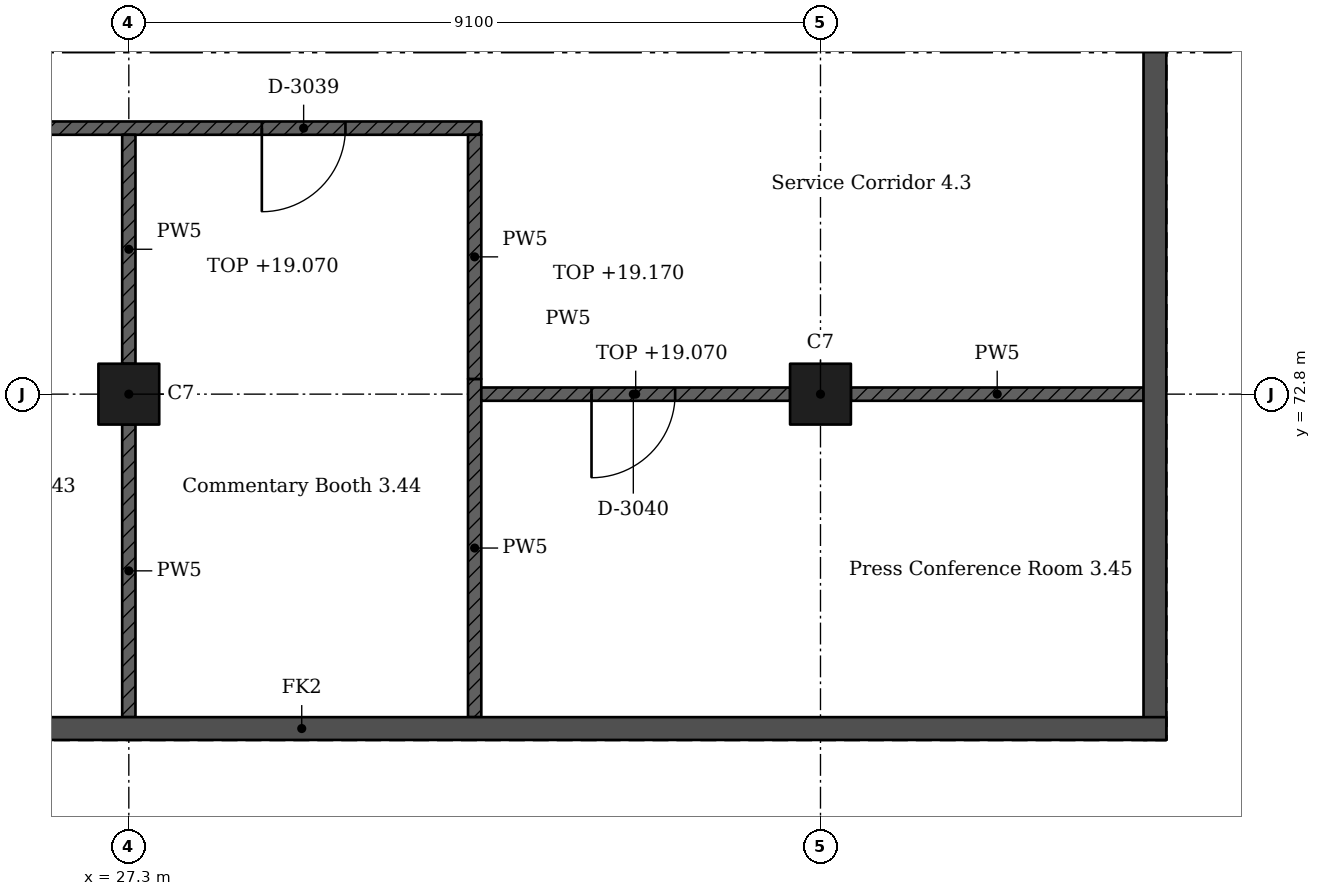
"""IFC4 building model, lengths in metres.
Left out: names, types, materials, properties, quantities, classifications, styles, units other than length and angle.
Written with IfcOpenShell. Run it as: python <this file> out.ifc"""

import sys

from ifc_helpers import new_model, si_unit, direction, frame, frame_2d, origin, origin_2d, place, context, subcontext, project, spatial, rectangle, extrude, element, fill, save


model = new_model("IFC4")
c1 = context("Model", 3, precision=1e-05, world=origin(), true_north=direction((0.0, 1.0)))
c2 = subcontext(c1, "Body", "Model", "MODEL_VIEW")
j1 = project(units=[si_unit("LENGTHUNIT", "METRE"), si_unit("PLANEANGLEUNIT", "RADIAN")], contexts=[c1])
p1 = place(None, origin())
s1 = spatial("IfcSite", under=j1, at=p1, CompositionType="ELEMENT")
p2 = place(p1, origin())
s2 = spatial("IfcBuilding", under=s1, at=p2, CompositionType="ELEMENT")
p3 = place(p2, frame((0.0, 0.0, 15.47)))
s3 = spatial("IfcBuildingStorey", under=s2, at=p3, CompositionType="ELEMENT", Elevation=15.47)
for number, where, z_axis, x_axis in (
    (1, (27.3, 72.8, 0.0), (0.0, 0.0, 1.0), (1.0, 0.0, 0.0)),
    (2, (36.4, 72.8, 0.0), (0.0, 0.0, 1.0), (1.0, 0.0, 0.0)),
):
    element("IfcColumn", number, at=place(p3, frame(where, z_axis=z_axis, x_axis=x_axis)), inside=s3, PredefinedType="COLUMN", context=c2, shape_type="SweptSolid", body=[
        extrude(rectangle(XDim=0.8, YDim=0.8, at=origin_2d()), origin(), (0.0, 0.0, 1.0), 4.55),
    ])
for number, where, z_axis, x_axis in (
    (3, (40.8, 68.25, 0.0), (0.0, 0.0, 1.0), (0.0, 1.0, 0.0)),
    (4, (40.95, 68.4, 0.0), (0.0, 0.0, 1.0), (-1.0, 0.0, 0.0)),
):
    element("IfcWall", number, at=place(p3, frame(where, z_axis=z_axis, x_axis=x_axis)), inside=s3, PredefinedType="SHEAR", context=c2, shape_type="SweptSolid", body=[
        extrude(rectangle(XDim=22.75, YDim=0.3, at=frame_2d((11.375, 0.0))), origin(), (0.0, 0.0, 1.0), 4.55),
    ])
p4 = place(p3, frame((9.1, 76.3, 0.0), z_axis=(0.0, 0.0, 1.0), x_axis=(1.0, 0.0, 0.0)))
e5 = element("IfcWall", 5, at=p4, inside=s3, PredefinedType="PARTITIONING", context=c2, shape_type="SweptSolid", body=[
    extrude(rectangle(XDim=22.837, YDim=0.175, at=frame_2d((11.419, 0.0))), origin(), (0.0, 0.0, 1.0), 4.3),
])
p5 = place(p4, frame((3.95, 0.0, 0.0)))
e6 = element("IfcOpeningElement", 6, at=p5, cuts=e5, PredefinedType="OPENING", context=c2, shape_type="SweptSolid", body=[
    extrude(rectangle(XDim=1.1, YDim=2.4, at=frame_2d((0.55, 1.2))), frame((0.0, 0.097, 0.0), z_axis=(0.0, -1.0, 0.0), x_axis=(1.0, 0.0, 0.0)), (0.0, 0.0, 1.0), 0.195),
])
p6 = place(p4, frame((10.85, 0.0, 0.0)))
e7 = element("IfcOpeningElement", 7, at=p6, cuts=e5, PredefinedType="OPENING", context=c2, shape_type="SweptSolid", body=[
    extrude(rectangle(XDim=1.1, YDim=2.4, at=frame_2d((0.55, 1.2))), frame((0.0, 0.097, 0.0), z_axis=(0.0, -1.0, 0.0), x_axis=(1.0, 0.0, 0.0)), (0.0, 0.0, 1.0), 0.195),
])
p7 = place(p4, frame((15.4, 0.0, 0.0)))
e8 = element("IfcOpeningElement", 8, at=p7, cuts=e5, PredefinedType="OPENING", context=c2, shape_type="SweptSolid", body=[
    extrude(rectangle(XDim=1.1, YDim=2.4, at=frame_2d((0.55, 1.2))), frame((0.0, 0.097, 0.0), z_axis=(0.0, -1.0, 0.0), x_axis=(1.0, 0.0, 0.0)), (0.0, 0.0, 1.0), 0.195),
])
p8 = place(p4, frame((19.95, 0.0, 0.0)))
e9 = element("IfcOpeningElement", 9, at=p8, cuts=e5, PredefinedType="OPENING", context=c2, shape_type="SweptSolid", body=[
    extrude(rectangle(XDim=1.1, YDim=2.4, at=frame_2d((0.55, 1.2))), frame((0.0, 0.097, 0.0), z_axis=(0.0, -1.0, 0.0), x_axis=(1.0, 0.0, 0.0)), (0.0, 0.0, 1.0), 0.195),
])
p9 = place(p3, frame((27.3, 72.4, 0.0), z_axis=(0.0, 0.0, 1.0), x_axis=(0.0, -1.0, 0.0)))
e10 = element("IfcWall", 10, at=p9, inside=s3, PredefinedType="PARTITIONING", context=c2, shape_type="SweptSolid", body=[
    extrude(rectangle(XDim=3.85, YDim=0.175, at=frame_2d((1.925, 0.0))), origin(), (0.0, 0.0, 1.0), 4.3),
])
p10 = place(p3, frame((27.3, 76.212, 0.0), z_axis=(0.0, 0.0, 1.0), x_axis=(0.0, -1.0, 0.0)))
e11 = element("IfcWall", 11, at=p10, inside=s3, PredefinedType="PARTITIONING", context=c2, shape_type="SweptSolid", body=[
    extrude(rectangle(XDim=3.012, YDim=0.175, at=frame_2d((1.506, 0.0))), origin(), (0.0, 0.0, 1.0), 3.6),
])
p11 = place(p3, frame((31.85, 68.55, 0.0), z_axis=(0.0, 0.0, 1.0), x_axis=(0.0, 1.0, 0.0)))
e12 = element("IfcWall", 12, at=p11, inside=s3, PredefinedType="PARTITIONING", context=c2, shape_type="SweptSolid", body=[
    extrude(rectangle(XDim=4.45, YDim=0.175, at=frame_2d((2.225, 0.0))), origin(), (0.0, 0.0, 1.0), 4.3),
])
p12 = place(p3, frame((31.938, 72.8, 0.0), z_axis=(0.0, 0.0, 1.0), x_axis=(1.0, 0.0, 0.0)))
e13 = element("IfcWall", 13, at=p12, inside=s3, PredefinedType="PARTITIONING", context=c2, shape_type="SweptSolid", body=[
    extrude(rectangle(XDim=4.062, YDim=0.175, at=frame_2d((2.031, 0.0))), origin(), (0.0, 0.0, 1.0), 3.6),
])
p13 = place(p12, frame((1.45, 0.0, 0.0)))
e14 = element("IfcOpeningElement", 14, at=p13, cuts=e13, PredefinedType="OPENING", context=c2, shape_type="SweptSolid", body=[
    extrude(rectangle(XDim=1.1, YDim=2.4, at=frame_2d((0.55, 1.2))), frame((0.0, 0.097, 0.0), z_axis=(0.0, -1.0, 0.0), x_axis=(1.0, 0.0, 0.0)), (0.0, 0.0, 1.0), 0.195),
])
p14 = place(p3, frame((36.8, 72.8, 0.0), z_axis=(0.0, 0.0, 1.0), x_axis=(1.0, 0.0, 0.0)))
e15 = element("IfcWall", 15, at=p14, inside=s3, PredefinedType="PARTITIONING", context=c2, shape_type="SweptSolid", body=[
    extrude(rectangle(XDim=3.85, YDim=0.175, at=frame_2d((1.925, 0.0))), origin(), (0.0, 0.0, 1.0), 4.3),
])
p15 = place(p3, frame((31.85, 73.0, 0.0), z_axis=(0.0, 0.0, 1.0), x_axis=(0.0, 1.0, 0.0)))
e16 = element("IfcWall", 16, at=p15, inside=s3, PredefinedType="PARTITIONING", context=c2, shape_type="SweptSolid", body=[
    extrude(rectangle(XDim=3.212, YDim=0.175, at=frame_2d((1.606, 0.0))), origin(), (0.0, 0.0, 1.0), 3.7),
])
p16 = place(p8, origin())
e17 = element("IfcDoor", 17, at=p16, inside=s3, OperationType="SINGLE_SWING_LEFT", PredefinedType="DOOR", context=c2, shape_type="SweptSolid", body=[
    extrude(rectangle(XDim=1.1, YDim=2.4, at=frame_2d((0.55, 1.2))), frame((0.0, 0.025, 0.0), z_axis=(0.0, -1.0, 0.0), x_axis=(1.0, 0.0, 0.0)), (0.0, 0.0, 1.0), 0.05),
])
fill(e9, e17)
p17 = place(p13, origin())
e18 = element("IfcDoor", 18, at=p17, inside=s3, OperationType="SINGLE_SWING_LEFT", PredefinedType="DOOR", context=c2, shape_type="SweptSolid", body=[
    extrude(rectangle(XDim=1.1, YDim=2.4, at=frame_2d((0.55, 1.2))), frame((0.0, 0.025, 0.0), z_axis=(0.0, -1.0, 0.0), x_axis=(1.0, 0.0, 0.0)), (0.0, 0.0, 1.0), 0.05),
])
fill(e14, e18)
save(model, sys.argv[1])
